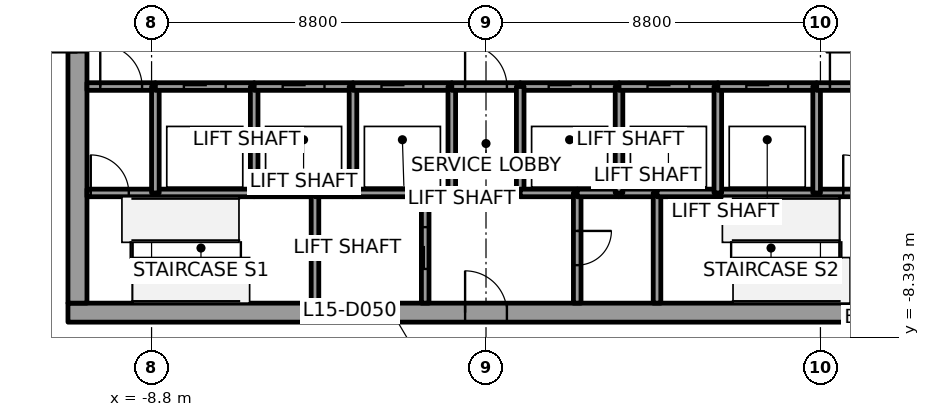
"""IFC4 building model, lengths in metres.
Left out: names, types, materials, properties, quantities, classifications, styles, units other than length and angle.
Written with IfcOpenShell. Run it as: python <this file> out.ifc"""

import sys

from ifc_helpers import new_model, si_unit, direction, frame, frame_2d, origin, place, context, subcontext, project, spatial, rectangle, extrude, element, fill, save


model = new_model("IFC4")
c1 = context("Model", 3, precision=1e-05, world=origin(), true_north=direction((0.0, 1.0)))
c2 = subcontext(c1, "Body", "Model", "MODEL_VIEW")
j1 = project(units=[si_unit("LENGTHUNIT", "METRE"), si_unit("PLANEANGLEUNIT", "RADIAN")], contexts=[c1])
p1 = place(None, origin())
s1 = spatial("IfcSite", under=j1, at=p1, CompositionType="ELEMENT")
p2 = place(p1, origin())
s2 = spatial("IfcBuilding", under=s1, at=p2, CompositionType="ELEMENT")
p3 = place(p2, frame((0.0, 0.0, 77.6)))
s3 = spatial("IfcBuildingStorey", under=s2, at=p3, CompositionType="ELEMENT", Elevation=77.6)
p4 = place(p3, frame((-11.0, -7.75, 0.0), z_axis=(0.0, 0.0, 1.0), x_axis=(1.0, 0.0, 0.0)))
e1 = element("IfcWall", 1, at=p4, inside=s3, PredefinedType="SHEAR", context=c2, shape_type="SweptSolid", body=[
    extrude(rectangle(XDim=22.0, YDim=0.5, at=frame_2d((11.0, 0.0))), origin(), (0.0, 0.0, 1.0), 3.7),
])
p5 = place(p4, frame((10.45, 0.0, 0.0)))
e2 = element("IfcOpeningElement", 2, at=p5, cuts=e1, PredefinedType="OPENING", context=c2, shape_type="SweptSolid", body=[
    extrude(rectangle(XDim=1.1, YDim=2.1, at=frame_2d((0.55, 1.05))), frame((0.0, 0.25, 0.0), z_axis=(0.0, -1.0, 0.0), x_axis=(1.0, 0.0, 0.0)), (0.0, 0.0, 1.0), 0.5),
])
p6 = place(p3, frame((-10.75, -7.5, 0.0), z_axis=(0.0, 0.0, 1.0), x_axis=(0.0, 1.0, 0.0)))
e3 = element("IfcWall", 3, at=p6, inside=s3, PredefinedType="SHEAR", context=c2, shape_type="SweptSolid", body=[
    extrude(rectangle(XDim=15.0, YDim=0.5, at=frame_2d((7.5, 0.0))), origin(), (0.0, 0.0, 1.0), 3.7),
])
p7 = place(p6, frame((6.6, 0.0, 0.0)))
e4 = element("IfcOpeningElement", 4, at=p7, cuts=e3, PredefinedType="OPENING", context=c2, shape_type="SweptSolid", body=[
    extrude(rectangle(XDim=1.8, YDim=2.1, at=frame_2d((0.9, 1.05))), frame((0.0, 0.25, 0.0), z_axis=(0.0, -1.0, 0.0), x_axis=(1.0, 0.0, 0.0)), (0.0, 0.0, 1.0), 0.5),
])
p8 = place(p3, frame((-10.5, -4.6, 0.0), z_axis=(0.0, 0.0, 1.0), x_axis=(1.0, 0.0, 0.0)))
e5 = element("IfcWall", 5, at=p8, inside=s3, PredefinedType="SOLIDWALL", context=c2, shape_type="SweptSolid", body=[
    extrude(rectangle(XDim=1.8, YDim=0.2, at=frame_2d((0.9, 0.0))), origin(), (0.0, 0.0, 1.0), 3.55),
])
p9 = place(p8, frame((0.1, 0.0, 0.0)))
e6 = element("IfcOpeningElement", 6, at=p9, cuts=e5, PredefinedType="OPENING", context=c2, shape_type="SweptSolid", body=[
    extrude(rectangle(XDim=1.0, YDim=2.1, at=frame_2d((0.5, 1.05))), frame((0.0, 0.1, 0.0), z_axis=(0.0, -1.0, 0.0), x_axis=(1.0, 0.0, 0.0)), (0.0, 0.0, 1.0), 0.2),
])
p10 = place(p3, frame((-10.5, -1.8, 0.0), z_axis=(0.0, 0.0, 1.0), x_axis=(1.0, 0.0, 0.0)))
e7 = element("IfcWall", 7, at=p10, inside=s3, PredefinedType="SOLIDWALL", context=c2, shape_type="SweptSolid", body=[
    extrude(rectangle(XDim=1.8, YDim=0.2, at=frame_2d((0.9, 0.0))), origin(), (0.0, 0.0, 1.0), 3.55),
])
p11 = place(p10, frame((0.35, 0.0, 0.0)))
e8 = element("IfcOpeningElement", 8, at=p11, cuts=e7, PredefinedType="OPENING", context=c2, shape_type="SweptSolid", body=[
    extrude(rectangle(XDim=1.1, YDim=2.1, at=frame_2d((0.55, 1.05))), frame((0.0, 0.1, 0.0), z_axis=(0.0, -1.0, 0.0), x_axis=(1.0, 0.0, 0.0)), (0.0, 0.0, 1.0), 0.2),
])
p12 = place(p3, frame((-8.7, -4.6, 0.0), z_axis=(0.0, 0.0, 1.0), x_axis=(1.0, 0.0, 0.0)))
e9 = element("IfcWall", 9, at=p12, inside=s3, PredefinedType="SOLIDWALL", context=c2, shape_type="SweptSolid", body=[
    extrude(rectangle(XDim=2.6, YDim=0.2, at=frame_2d((1.3, 0.0))), origin(), (0.0, 0.0, 1.0), 3.55),
])
p13 = place(p3, frame((-8.7, -4.6, 0.0), z_axis=(0.0, 0.0, 1.0), x_axis=(0.0, 1.0, 0.0)))
e10 = element("IfcWall", 10, at=p13, inside=s3, PredefinedType="SOLIDWALL", context=c2, shape_type="SweptSolid", body=[
    extrude(rectangle(XDim=2.8, YDim=0.2, at=frame_2d((1.4, 0.0))), origin(), (0.0, 0.0, 1.0), 3.55),
])
p14 = place(p3, frame((-8.7, -1.8, 0.0), z_axis=(0.0, 0.0, 1.0), x_axis=(1.0, 0.0, 0.0)))
e11 = element("IfcWall", 11, at=p14, inside=s3, PredefinedType="SOLIDWALL", context=c2, shape_type="SweptSolid", body=[
    extrude(rectangle(XDim=2.6, YDim=0.2, at=frame_2d((1.3, 0.0))), origin(), (0.0, 0.0, 1.0), 3.55),
])
p15 = place(p14, frame((0.75, 0.0, 0.0)))
e12 = element("IfcOpeningElement", 12, at=p15, cuts=e11, PredefinedType="OPENING", context=c2, shape_type="SweptSolid", body=[
    extrude(rectangle(XDim=1.1, YDim=2.1, at=frame_2d((0.55, 1.05))), frame((0.0, 0.1, 0.0), z_axis=(0.0, -1.0, 0.0), x_axis=(1.0, 0.0, 0.0)), (0.0, 0.0, 1.0), 0.2),
])
p16 = place(p3, frame((-6.1, -4.6, 0.0), z_axis=(0.0, 0.0, 1.0), x_axis=(1.0, 0.0, 0.0)))
e13 = element("IfcWall", 13, at=p16, inside=s3, PredefinedType="SOLIDWALL", context=c2, shape_type="SweptSolid", body=[
    extrude(rectangle(XDim=1.6, YDim=0.2, at=frame_2d((0.8, 0.0))), origin(), (0.0, 0.0, 1.0), 3.55),
])
p17 = place(p3, frame((-6.1, -4.6, 0.0), z_axis=(0.0, 0.0, 1.0), x_axis=(0.0, 1.0, 0.0)))
e14 = element("IfcWall", 14, at=p17, inside=s3, PredefinedType="SOLIDWALL", context=c2, shape_type="SweptSolid", body=[
    extrude(rectangle(XDim=2.8, YDim=0.2, at=frame_2d((1.4, 0.0))), origin(), (0.0, 0.0, 1.0), 3.55),
])
p18 = place(p3, frame((-6.1, -1.8, 0.0), z_axis=(0.0, 0.0, 1.0), x_axis=(1.0, 0.0, 0.0)))
e15 = element("IfcWall", 15, at=p18, inside=s3, PredefinedType="SOLIDWALL", context=c2, shape_type="SweptSolid", body=[
    extrude(rectangle(XDim=2.6, YDim=0.2, at=frame_2d((1.3, 0.0))), origin(), (0.0, 0.0, 1.0), 3.55),
])
p19 = place(p18, frame((0.75, 0.0, 0.0)))
e16 = element("IfcOpeningElement", 16, at=p19, cuts=e15, PredefinedType="OPENING", context=c2, shape_type="SweptSolid", body=[
    extrude(rectangle(XDim=1.1, YDim=2.1, at=frame_2d((0.55, 1.05))), frame((0.0, 0.1, 0.0), z_axis=(0.0, -1.0, 0.0), x_axis=(1.0, 0.0, 0.0)), (0.0, 0.0, 1.0), 0.2),
])
p20 = place(p3, frame((-4.5, -4.6, 0.0), z_axis=(0.0, 0.0, 1.0), x_axis=(0.0, -1.0, 0.0)))
e17 = element("IfcWall", 17, at=p20, inside=s3, PredefinedType="SOLIDWALL", context=c2, shape_type="SweptSolid", body=[
    extrude(rectangle(XDim=2.9, YDim=0.2, at=frame_2d((1.45, 0.0))), origin(), (0.0, 0.0, 1.0), 3.55),
])
p21 = place(p3, frame((-4.5, -4.6, 0.0), z_axis=(0.0, 0.0, 1.0), x_axis=(1.0, 0.0, 0.0)))
e18 = element("IfcWall", 18, at=p21, inside=s3, PredefinedType="SOLIDWALL", context=c2, shape_type="SweptSolid", body=[
    extrude(rectangle(XDim=1.0, YDim=0.2, at=frame_2d((0.5, 0.0))), origin(), (0.0, 0.0, 1.0), 3.55),
])
p22 = place(p3, frame((-3.5, -4.6, 0.0), z_axis=(0.0, 0.0, 1.0), x_axis=(1.0, 0.0, 0.0)))
e19 = element("IfcWall", 19, at=p22, inside=s3, PredefinedType="SOLIDWALL", context=c2, shape_type="SweptSolid", body=[
    extrude(rectangle(XDim=1.9, YDim=0.2, at=frame_2d((0.95, 0.0))), origin(), (0.0, 0.0, 1.0), 3.55),
])
p23 = place(p3, frame((-3.5, -4.6, 0.0), z_axis=(0.0, 0.0, 1.0), x_axis=(0.0, 1.0, 0.0)))
e20 = element("IfcWall", 20, at=p23, inside=s3, PredefinedType="SOLIDWALL", context=c2, shape_type="SweptSolid", body=[
    extrude(rectangle(XDim=2.8, YDim=0.2, at=frame_2d((1.4, 0.0))), origin(), (0.0, 0.0, 1.0), 3.55),
])
p24 = place(p3, frame((-3.5, -1.8, 0.0), z_axis=(0.0, 0.0, 1.0), x_axis=(1.0, 0.0, 0.0)))
e21 = element("IfcWall", 21, at=p24, inside=s3, PredefinedType="SOLIDWALL", context=c2, shape_type="SweptSolid", body=[
    extrude(rectangle(XDim=2.6, YDim=0.2, at=frame_2d((1.3, 0.0))), origin(), (0.0, 0.0, 1.0), 3.55),
])
p25 = place(p24, frame((0.75, 0.0, 0.0)))
e22 = element("IfcOpeningElement", 22, at=p25, cuts=e21, PredefinedType="OPENING", context=c2, shape_type="SweptSolid", body=[
    extrude(rectangle(XDim=1.1, YDim=2.1, at=frame_2d((0.55, 1.05))), frame((0.0, 0.1, 0.0), z_axis=(0.0, -1.0, 0.0), x_axis=(1.0, 0.0, 0.0)), (0.0, 0.0, 1.0), 0.2),
])
p26 = place(p3, frame((-1.6, -7.5, 0.0), z_axis=(0.0, 0.0, 1.0), x_axis=(0.0, 1.0, 0.0)))
e23 = element("IfcWall", 23, at=p26, inside=s3, PredefinedType="SOLIDWALL", context=c2, shape_type="SweptSolid", body=[
    extrude(rectangle(XDim=2.9, YDim=0.2, at=frame_2d((1.45, 0.0))), origin(), (0.0, 0.0, 1.0), 3.55),
])
p27 = place(p26, frame((0.9, 0.0, 0.0)))
e24 = element("IfcOpeningElement", 24, at=p27, cuts=e23, PredefinedType="OPENING", context=c2, shape_type="SweptSolid", body=[
    extrude(rectangle(XDim=1.1, YDim=2.1, at=frame_2d((0.55, 1.05))), frame((0.0, 0.1, 0.0), z_axis=(0.0, -1.0, 0.0), x_axis=(1.0, 0.0, 0.0)), (0.0, 0.0, 1.0), 0.2),
])
p28 = place(p3, frame((-1.6, -4.6, 0.0), z_axis=(0.0, 0.0, 1.0), x_axis=(1.0, 0.0, 0.0)))
e25 = element("IfcWall", 25, at=p28, inside=s3, PredefinedType="SOLIDWALL", context=c2, shape_type="SweptSolid", body=[
    extrude(rectangle(XDim=0.7, YDim=0.2, at=frame_2d((0.35, 0.0))), origin(), (0.0, 0.0, 1.0), 3.55),
])
p29 = place(p3, frame((-0.9, -4.6, 0.0), z_axis=(0.0, 0.0, 1.0), x_axis=(0.0, 1.0, 0.0)))
e26 = element("IfcWall", 26, at=p29, inside=s3, PredefinedType="SOLIDWALL", context=c2, shape_type="SweptSolid", body=[
    extrude(rectangle(XDim=2.8, YDim=0.2, at=frame_2d((1.4, 0.0))), origin(), (0.0, 0.0, 1.0), 3.55),
])
p30 = place(p3, frame((-0.9, -1.8, 0.0), z_axis=(0.0, 0.0, 1.0), x_axis=(1.0, 0.0, 0.0)))
e27 = element("IfcWall", 27, at=p30, inside=s3, PredefinedType="SOLIDWALL", context=c2, shape_type="SweptSolid", body=[
    extrude(rectangle(XDim=1.8, YDim=0.2, at=frame_2d((0.9, 0.0))), origin(), (0.0, 0.0, 1.0), 3.55),
])
p31 = place(p30, frame((0.35, 0.0, 0.0)))
e28 = element("IfcOpeningElement", 28, at=p31, cuts=e27, PredefinedType="OPENING", context=c2, shape_type="SweptSolid", body=[
    extrude(rectangle(XDim=1.1, YDim=2.1, at=frame_2d((0.55, 1.05))), frame((0.0, 0.1, 0.0), z_axis=(0.0, -1.0, 0.0), x_axis=(1.0, 0.0, 0.0)), (0.0, 0.0, 1.0), 0.2),
])
p32 = place(p3, frame((0.9, -1.8, 0.0), z_axis=(0.0, 0.0, 1.0), x_axis=(1.0, 0.0, 0.0)))
e29 = element("IfcWall", 29, at=p32, inside=s3, PredefinedType="SOLIDWALL", context=c2, shape_type="SweptSolid", body=[
    extrude(rectangle(XDim=2.6, YDim=0.2, at=frame_2d((1.3, 0.0))), origin(), (0.0, 0.0, 1.0), 3.55),
])
p33 = place(p32, frame((0.75, 0.0, 0.0)))
e30 = element("IfcOpeningElement", 30, at=p33, cuts=e29, PredefinedType="OPENING", context=c2, shape_type="SweptSolid", body=[
    extrude(rectangle(XDim=1.1, YDim=2.1, at=frame_2d((0.55, 1.05))), frame((0.0, 0.1, 0.0), z_axis=(0.0, -1.0, 0.0), x_axis=(1.0, 0.0, 0.0)), (0.0, 0.0, 1.0), 0.2),
])
p34 = place(p3, frame((0.9, -1.8, 0.0), z_axis=(0.0, 0.0, 1.0), x_axis=(0.0, -1.0, 0.0)))
e31 = element("IfcWall", 31, at=p34, inside=s3, PredefinedType="SOLIDWALL", context=c2, shape_type="SweptSolid", body=[
    extrude(rectangle(XDim=2.8, YDim=0.2, at=frame_2d((1.4, 0.0))), origin(), (0.0, 0.0, 1.0), 3.55),
])
p35 = place(p3, frame((0.9, -4.6, 0.0), z_axis=(0.0, 0.0, 1.0), x_axis=(1.0, 0.0, 0.0)))
e32 = element("IfcWall", 32, at=p35, inside=s3, PredefinedType="SOLIDWALL", context=c2, shape_type="SweptSolid", body=[
    extrude(rectangle(XDim=1.5, YDim=0.2, at=frame_2d((0.75, 0.0))), origin(), (0.0, 0.0, 1.0), 3.55),
])
p36 = place(p3, frame((2.4, -4.6, 0.0), z_axis=(0.0, 0.0, 1.0), x_axis=(0.0, -1.0, 0.0)))
e33 = element("IfcWall", 33, at=p36, inside=s3, PredefinedType="SOLIDWALL", context=c2, shape_type="SweptSolid", body=[
    extrude(rectangle(XDim=2.9, YDim=0.2, at=frame_2d((1.45, 0.0))), origin(), (0.0, 0.0, 1.0), 3.55),
])
p37 = place(p36, frame((1.0, 0.0, 0.0)))
e34 = element("IfcOpeningElement", 34, at=p37, cuts=e33, PredefinedType="OPENING", context=c2, shape_type="SweptSolid", body=[
    extrude(rectangle(XDim=0.9, YDim=2.1, at=frame_2d((0.45, 1.05))), frame((0.0, 0.1, 0.0), z_axis=(0.0, -1.0, 0.0), x_axis=(1.0, 0.0, 0.0)), (0.0, 0.0, 1.0), 0.2),
])
p38 = place(p3, frame((3.5, -4.6, 0.0), z_axis=(0.0, 0.0, 1.0), x_axis=(-1.0, 0.0, 0.0)))
e35 = element("IfcWall", 35, at=p38, inside=s3, PredefinedType="SOLIDWALL", context=c2, shape_type="SweptSolid", body=[
    extrude(rectangle(XDim=1.1, YDim=0.2, at=frame_2d((0.55, 0.0))), origin(), (0.0, 0.0, 1.0), 3.55),
])
p39 = place(p3, frame((4.5, -4.6, 0.0), z_axis=(0.0, 0.0, 1.0), x_axis=(-1.0, 0.0, 0.0)))
e36 = element("IfcWall", 36, at=p39, inside=s3, PredefinedType="SOLIDWALL", context=c2, shape_type="SweptSolid", body=[
    extrude(rectangle(XDim=1.0, YDim=0.2, at=frame_2d((0.5, 0.0))), origin(), (0.0, 0.0, 1.0), 3.55),
])
p40 = place(p3, frame((3.5, -4.6, 0.0), z_axis=(0.0, 0.0, 1.0), x_axis=(0.0, 1.0, 0.0)))
e37 = element("IfcWall", 37, at=p40, inside=s3, PredefinedType="SOLIDWALL", context=c2, shape_type="SweptSolid", body=[
    extrude(rectangle(XDim=2.8, YDim=0.2, at=frame_2d((1.4, 0.0))), origin(), (0.0, 0.0, 1.0), 3.55),
])
p41 = place(p3, frame((3.5, -1.8, 0.0), z_axis=(0.0, 0.0, 1.0), x_axis=(1.0, 0.0, 0.0)))
e38 = element("IfcWall", 38, at=p41, inside=s3, PredefinedType="SOLIDWALL", context=c2, shape_type="SweptSolid", body=[
    extrude(rectangle(XDim=2.6, YDim=0.2, at=frame_2d((1.3, 0.0))), origin(), (0.0, 0.0, 1.0), 3.55),
])
p42 = place(p41, frame((0.75, 0.0, 0.0)))
e39 = element("IfcOpeningElement", 39, at=p42, cuts=e38, PredefinedType="OPENING", context=c2, shape_type="SweptSolid", body=[
    extrude(rectangle(XDim=1.1, YDim=2.1, at=frame_2d((0.55, 1.05))), frame((0.0, 0.1, 0.0), z_axis=(0.0, -1.0, 0.0), x_axis=(1.0, 0.0, 0.0)), (0.0, 0.0, 1.0), 0.2),
])
p43 = place(p3, frame((4.5, -7.5, 0.0), z_axis=(0.0, 0.0, 1.0), x_axis=(0.0, 1.0, 0.0)))
e40 = element("IfcWall", 40, at=p43, inside=s3, PredefinedType="SOLIDWALL", context=c2, shape_type="SweptSolid", body=[
    extrude(rectangle(XDim=2.9, YDim=0.2, at=frame_2d((1.45, 0.0))), origin(), (0.0, 0.0, 1.0), 3.55),
])
p44 = place(p3, frame((4.5, -4.6, 0.0), z_axis=(0.0, 0.0, 1.0), x_axis=(1.0, 0.0, 0.0)))
e41 = element("IfcWall", 41, at=p44, inside=s3, PredefinedType="SOLIDWALL", context=c2, shape_type="SweptSolid", body=[
    extrude(rectangle(XDim=1.6, YDim=0.2, at=frame_2d((0.8, 0.0))), origin(), (0.0, 0.0, 1.0), 3.55),
])
p45 = place(p3, frame((6.1, -4.6, 0.0), z_axis=(0.0, 0.0, 1.0), x_axis=(1.0, 0.0, 0.0)))
e42 = element("IfcWall", 42, at=p45, inside=s3, PredefinedType="SOLIDWALL", context=c2, shape_type="SweptSolid", body=[
    extrude(rectangle(XDim=2.6, YDim=0.2, at=frame_2d((1.3, 0.0))), origin(), (0.0, 0.0, 1.0), 3.55),
])
p46 = place(p3, frame((6.1, -4.6, 0.0), z_axis=(0.0, 0.0, 1.0), x_axis=(0.0, 1.0, 0.0)))
e43 = element("IfcWall", 43, at=p46, inside=s3, PredefinedType="SOLIDWALL", context=c2, shape_type="SweptSolid", body=[
    extrude(rectangle(XDim=2.8, YDim=0.2, at=frame_2d((1.4, 0.0))), origin(), (0.0, 0.0, 1.0), 3.55),
])
p47 = place(p3, frame((6.1, -1.8, 0.0), z_axis=(0.0, 0.0, 1.0), x_axis=(1.0, 0.0, 0.0)))
e44 = element("IfcWall", 44, at=p47, inside=s3, PredefinedType="SOLIDWALL", context=c2, shape_type="SweptSolid", body=[
    extrude(rectangle(XDim=2.6, YDim=0.2, at=frame_2d((1.3, 0.0))), origin(), (0.0, 0.0, 1.0), 3.55),
])
p48 = place(p47, frame((0.75, 0.0, 0.0)))
e45 = element("IfcOpeningElement", 45, at=p48, cuts=e44, PredefinedType="OPENING", context=c2, shape_type="SweptSolid", body=[
    extrude(rectangle(XDim=1.1, YDim=2.1, at=frame_2d((0.55, 1.05))), frame((0.0, 0.1, 0.0), z_axis=(0.0, -1.0, 0.0), x_axis=(1.0, 0.0, 0.0)), (0.0, 0.0, 1.0), 0.2),
])
p49 = place(p3, frame((8.7, -4.6, 0.0), z_axis=(0.0, 0.0, 1.0), x_axis=(1.0, 0.0, 0.0)))
e46 = element("IfcWall", 46, at=p49, inside=s3, PredefinedType="SOLIDWALL", context=c2, shape_type="SweptSolid", body=[
    extrude(rectangle(XDim=1.8, YDim=0.2, at=frame_2d((0.9, 0.0))), origin(), (0.0, 0.0, 1.0), 3.55),
])
p50 = place(p49, frame((0.7, 0.0, 0.0)))
e47 = element("IfcOpeningElement", 47, at=p50, cuts=e46, PredefinedType="OPENING", context=c2, shape_type="SweptSolid", body=[
    extrude(rectangle(XDim=1.0, YDim=2.1, at=frame_2d((0.5, 1.05))), frame((0.0, 0.1, 0.0), z_axis=(0.0, -1.0, 0.0), x_axis=(1.0, 0.0, 0.0)), (0.0, 0.0, 1.0), 0.2),
])
p51 = place(p3, frame((8.7, -1.8, 0.0), z_axis=(0.0, 0.0, 1.0), x_axis=(0.0, -1.0, 0.0)))
e48 = element("IfcWall", 48, at=p51, inside=s3, PredefinedType="SOLIDWALL", context=c2, shape_type="SweptSolid", body=[
    extrude(rectangle(XDim=2.8, YDim=0.2, at=frame_2d((1.4, 0.0))), origin(), (0.0, 0.0, 1.0), 3.55),
])
p52 = place(p3, frame((8.7, -1.8, 0.0), z_axis=(0.0, 0.0, 1.0), x_axis=(1.0, 0.0, 0.0)))
e49 = element("IfcWall", 49, at=p52, inside=s3, PredefinedType="SOLIDWALL", context=c2, shape_type="SweptSolid", body=[
    extrude(rectangle(XDim=1.8, YDim=0.2, at=frame_2d((0.9, 0.0))), origin(), (0.0, 0.0, 1.0), 3.55),
])
p53 = place(p52, frame((0.35, 0.0, 0.0)))
e50 = element("IfcOpeningElement", 50, at=p53, cuts=e49, PredefinedType="OPENING", context=c2, shape_type="SweptSolid", body=[
    extrude(rectangle(XDim=1.1, YDim=2.1, at=frame_2d((0.55, 1.05))), frame((0.0, 0.1, 0.0), z_axis=(0.0, -1.0, 0.0), x_axis=(1.0, 0.0, 0.0)), (0.0, 0.0, 1.0), 0.2),
])
p54 = place(p15, origin())
e51 = element("IfcDoor", 51, at=p54, inside=s3, OperationType="SLIDING_TO_RIGHT", PredefinedType="DOOR", context=c2, shape_type="SweptSolid", body=[
    extrude(rectangle(XDim=1.1, YDim=2.1, at=frame_2d((0.55, 1.05))), frame((0.0, 0.025, 0.0), z_axis=(0.0, -1.0, 0.0), x_axis=(1.0, 0.0, 0.0)), (0.0, 0.0, 1.0), 0.05),
])
fill(e12, e51)
p55 = place(p19, origin())
e52 = element("IfcDoor", 52, at=p55, inside=s3, OperationType="SLIDING_TO_LEFT", PredefinedType="DOOR", context=c2, shape_type="SweptSolid", body=[
    extrude(rectangle(XDim=1.1, YDim=2.1, at=frame_2d((0.55, 1.05))), frame((0.0, 0.025, 0.0), z_axis=(0.0, -1.0, 0.0), x_axis=(1.0, 0.0, 0.0)), (0.0, 0.0, 1.0), 0.05),
])
fill(e16, e52)
p56 = place(p25, origin())
e53 = element("IfcDoor", 53, at=p56, inside=s3, OperationType="SLIDING_TO_LEFT", PredefinedType="DOOR", context=c2, shape_type="SweptSolid", body=[
    extrude(rectangle(XDim=1.1, YDim=2.1, at=frame_2d((0.55, 1.05))), frame((0.0, 0.025, 0.0), z_axis=(0.0, -1.0, 0.0), x_axis=(1.0, 0.0, 0.0)), (0.0, 0.0, 1.0), 0.05),
])
fill(e22, e53)
p57 = place(p33, origin())
e54 = element("IfcDoor", 54, at=p57, inside=s3, OperationType="SLIDING_TO_LEFT", PredefinedType="DOOR", context=c2, shape_type="SweptSolid", body=[
    extrude(rectangle(XDim=1.1, YDim=2.1, at=frame_2d((0.55, 1.05))), frame((0.0, 0.025, 0.0), z_axis=(0.0, -1.0, 0.0), x_axis=(1.0, 0.0, 0.0)), (0.0, 0.0, 1.0), 0.05),
])
fill(e30, e54)
p58 = place(p42, origin())
e55 = element("IfcDoor", 55, at=p58, inside=s3, OperationType="SLIDING_TO_RIGHT", PredefinedType="DOOR", context=c2, shape_type="SweptSolid", body=[
    extrude(rectangle(XDim=1.1, YDim=2.1, at=frame_2d((0.55, 1.05))), frame((0.0, 0.025, 0.0), z_axis=(0.0, -1.0, 0.0), x_axis=(1.0, 0.0, 0.0)), (0.0, 0.0, 1.0), 0.05),
])
fill(e39, e55)
p59 = place(p48, origin())
e56 = element("IfcDoor", 56, at=p59, inside=s3, OperationType="SLIDING_TO_LEFT", PredefinedType="DOOR", context=c2, shape_type="SweptSolid", body=[
    extrude(rectangle(XDim=1.1, YDim=2.1, at=frame_2d((0.55, 1.05))), frame((0.0, 0.025, 0.0), z_axis=(0.0, -1.0, 0.0), x_axis=(1.0, 0.0, 0.0)), (0.0, 0.0, 1.0), 0.05),
])
fill(e45, e56)
p60 = place(p27, origin())
e57 = element("IfcDoor", 57, at=p60, inside=s3, OperationType="SLIDING_TO_LEFT", PredefinedType="DOOR", context=c2, shape_type="SweptSolid", body=[
    extrude(rectangle(XDim=1.1, YDim=2.1, at=frame_2d((0.55, 1.05))), frame((0.0, 0.025, 0.0), z_axis=(0.0, -1.0, 0.0), x_axis=(1.0, 0.0, 0.0)), (0.0, 0.0, 1.0), 0.05),
])
fill(e24, e57)
p61 = place(p11, origin())
e58 = element("IfcDoor", 58, at=p61, inside=s3, OperationType="SINGLE_SWING_LEFT", PredefinedType="DOOR", context=c2, shape_type="SweptSolid", body=[
    extrude(rectangle(XDim=1.1, YDim=2.1, at=frame_2d((0.55, 1.05))), frame((0.0, 0.025, 0.0), z_axis=(0.0, -1.0, 0.0), x_axis=(1.0, 0.0, 0.0)), (0.0, 0.0, 1.0), 0.05),
])
fill(e8, e58)
p62 = place(p53, origin())
e59 = element("IfcDoor", 59, at=p62, inside=s3, OperationType="SINGLE_SWING_RIGHT", PredefinedType="DOOR", context=c2, shape_type="SweptSolid", body=[
    extrude(rectangle(XDim=1.1, YDim=2.1, at=frame_2d((0.55, 1.05))), frame((0.0, 0.025, 0.0), z_axis=(0.0, -1.0, 0.0), x_axis=(1.0, 0.0, 0.0)), (0.0, 0.0, 1.0), 0.05),
])
fill(e50, e59)
p63 = place(p31, origin())
e60 = element("IfcDoor", 60, at=p63, inside=s3, OperationType="SINGLE_SWING_LEFT", PredefinedType="DOOR", context=c2, shape_type="SweptSolid", body=[
    extrude(rectangle(XDim=1.1, YDim=2.1, at=frame_2d((0.55, 1.05))), frame((0.0, 0.025, 0.0), z_axis=(0.0, -1.0, 0.0), x_axis=(1.0, 0.0, 0.0)), (0.0, 0.0, 1.0), 0.05),
])
fill(e28, e60)
p64 = place(p9, origin())
e61 = element("IfcDoor", 61, at=p64, inside=s3, OperationType="SINGLE_SWING_LEFT", PredefinedType="DOOR", context=c2, shape_type="SweptSolid", body=[
    extrude(rectangle(XDim=1.0, YDim=2.1, at=frame_2d((0.5, 1.05))), frame((0.0, 0.025, 0.0), z_axis=(0.0, -1.0, 0.0), x_axis=(1.0, 0.0, 0.0)), (0.0, 0.0, 1.0), 0.05),
])
fill(e6, e61)
p65 = place(p50, origin())
e62 = element("IfcDoor", 62, at=p65, inside=s3, OperationType="SINGLE_SWING_RIGHT", PredefinedType="DOOR", context=c2, shape_type="SweptSolid", body=[
    extrude(rectangle(XDim=1.0, YDim=2.1, at=frame_2d((0.5, 1.05))), frame((0.0, 0.025, 0.0), z_axis=(0.0, -1.0, 0.0), x_axis=(1.0, 0.0, 0.0)), (0.0, 0.0, 1.0), 0.05),
])
fill(e47, e62)
p66 = place(p37, origin())
e63 = element("IfcDoor", 63, at=p66, inside=s3, OperationType="SINGLE_SWING_RIGHT", PredefinedType="DOOR", context=c2, shape_type="SweptSolid", body=[
    extrude(rectangle(XDim=0.9, YDim=2.1, at=frame_2d((0.45, 1.05))), frame((0.0, 0.025, 0.0), z_axis=(0.0, -1.0, 0.0), x_axis=(1.0, 0.0, 0.0)), (0.0, 0.0, 1.0), 0.05),
])
fill(e34, e63)
p67 = place(p7, origin())
e64 = element("IfcDoor", 64, at=p67, inside=s3, OperationType="DOUBLE_DOOR_SINGLE_SWING", PredefinedType="DOOR", context=c2, shape_type="SweptSolid", body=[
    extrude(rectangle(XDim=1.8, YDim=2.1, at=frame_2d((0.9, 1.05))), frame((0.0, 0.025, 0.0), z_axis=(0.0, -1.0, 0.0), x_axis=(1.0, 0.0, 0.0)), (0.0, 0.0, 1.0), 0.05),
])
fill(e4, e64)
p68 = place(p5, origin())
e65 = element("IfcDoor", 65, at=p68, inside=s3, OperationType="SINGLE_SWING_LEFT", PredefinedType="DOOR", context=c2, shape_type="SweptSolid", body=[
    extrude(rectangle(XDim=1.1, YDim=2.1, at=frame_2d((0.55, 1.05))), frame((0.0, 0.025, 0.0), z_axis=(0.0, -1.0, 0.0), x_axis=(1.0, 0.0, 0.0)), (0.0, 0.0, 1.0), 0.05),
])
fill(e2, e65)
save(model, sys.argv[1])
